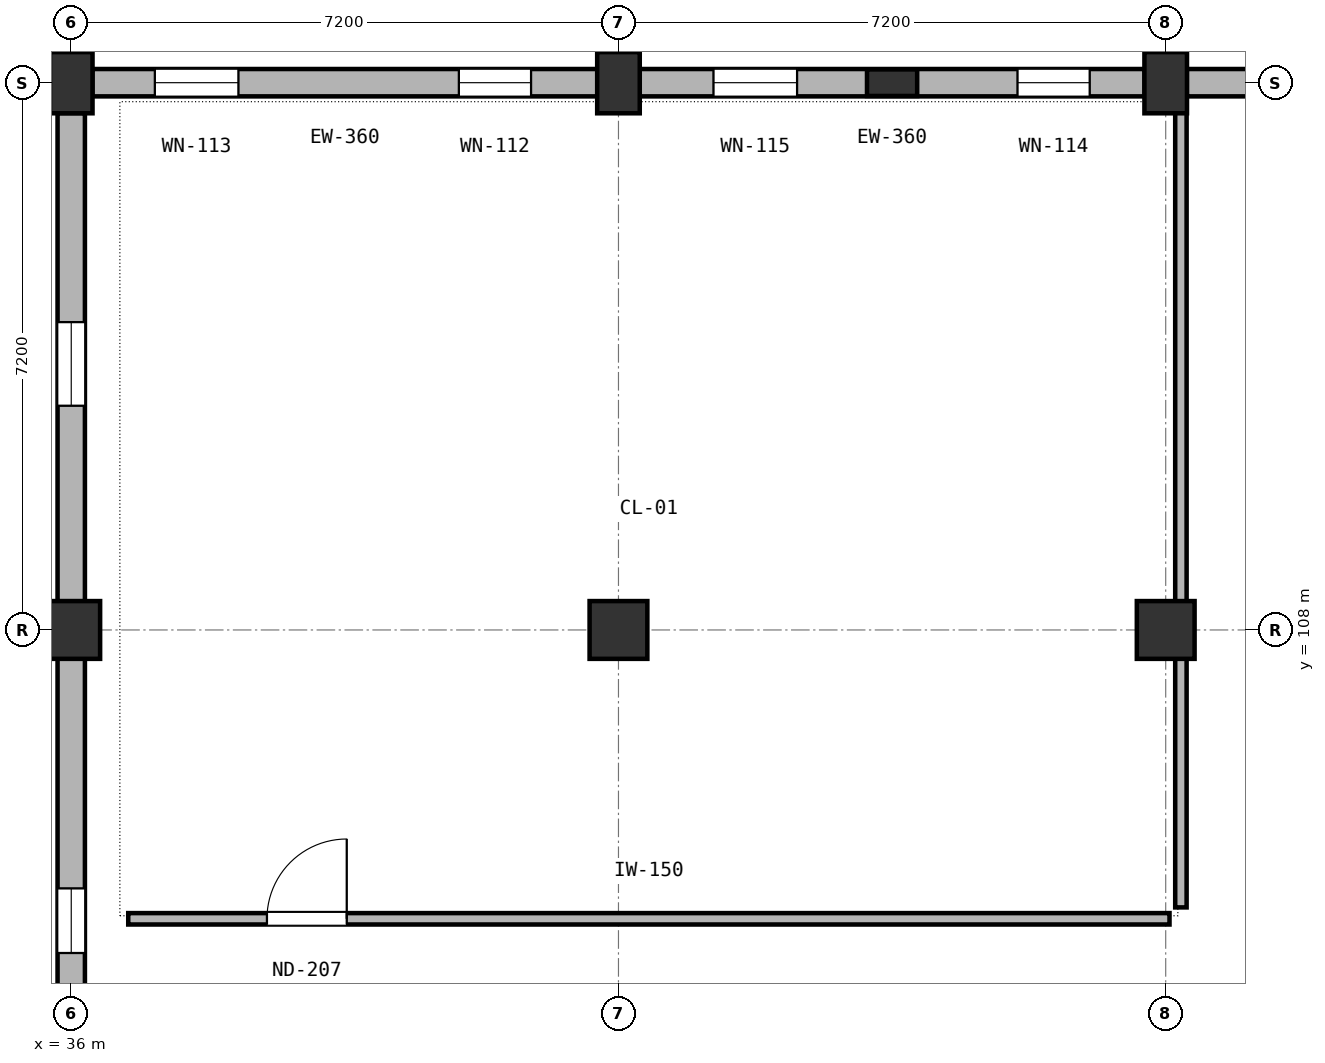
"""IFC4 building model, lengths in metres.
Left out: names, types, materials, properties, quantities, classifications, styles, units other than length and angle.
Written with IfcOpenShell. Run it as: python <this file> out.ifc"""

import sys

from ifc_helpers import new_model, si_unit, direction, frame, frame_2d, origin, origin_2d, place, context, subcontext, project, spatial, rectangle, extrude, element, fill, save


model = new_model("IFC4")
c1 = context("Model", 3, precision=1e-05, world=origin(), true_north=direction((0.0, 1.0)))
c2 = subcontext(c1, "Body", "Model", "MODEL_VIEW")
j1 = project(units=[si_unit("LENGTHUNIT", "METRE"), si_unit("PLANEANGLEUNIT", "RADIAN")], contexts=[c1])
p1 = place(None, origin())
s1 = spatial("IfcSite", under=j1, at=p1, CompositionType="ELEMENT")
p2 = place(p1, origin())
s2 = spatial("IfcBuilding", under=s1, at=p2, CompositionType="ELEMENT")
p3 = place(p2, frame((0.0, 0.0, 18.6)))
s3 = spatial("IfcBuildingStorey", under=s2, at=p3, CompositionType="ELEMENT", Elevation=18.6)
p4 = place(p3, frame((36.0, 108.0, 0.0), z_axis=(0.0, 0.0, 1.0), x_axis=(1.0, 0.0, 0.0)))
e1 = element("IfcColumn", 1, at=p4, inside=s3, PredefinedType="COLUMN", context=c2, shape_type="SweptSolid", body=[
    extrude(rectangle(XDim=0.76, YDim=0.76, at=origin_2d()), origin(), (0.0, 0.0, 1.0), 3.9),
])
p5 = place(p3, frame((36.0, 115.2, 0.0), z_axis=(0.0, 0.0, 1.0), x_axis=(1.0, 0.0, 0.0)))
e2 = element("IfcColumn", 2, at=p5, inside=s3, PredefinedType="COLUMN", context=c2, shape_type="SweptSolid", body=[
    extrude(rectangle(XDim=0.56, YDim=0.805, at=origin_2d()), origin(), (0.0, 0.0, 1.0), 3.9),
])
p6 = place(p3, frame((43.2, 108.0, 0.0), z_axis=(0.0, 0.0, 1.0), x_axis=(1.0, 0.0, 0.0)))
e3 = element("IfcColumn", 3, at=p6, inside=s3, PredefinedType="COLUMN", context=c2, shape_type="SweptSolid", body=[
    extrude(rectangle(XDim=0.76, YDim=0.76, at=origin_2d()), origin(), (0.0, 0.0, 1.0), 3.9),
])
p7 = place(p3, frame((43.2, 115.2, 0.0), z_axis=(0.0, 0.0, 1.0), x_axis=(1.0, 0.0, 0.0)))
e4 = element("IfcColumn", 4, at=p7, inside=s3, PredefinedType="COLUMN", context=c2, shape_type="SweptSolid", body=[
    extrude(rectangle(XDim=0.56, YDim=0.805, at=origin_2d()), origin(), (0.0, 0.0, 1.0), 3.9),
])
p8 = place(p3, frame((50.4, 108.0, 0.0), z_axis=(0.0, 0.0, 1.0), x_axis=(1.0, 0.0, 0.0)))
e5 = element("IfcColumn", 5, at=p8, inside=s3, PredefinedType="COLUMN", context=c2, shape_type="SweptSolid", body=[
    extrude(rectangle(XDim=0.76, YDim=0.76, at=origin_2d()), origin(), (0.0, 0.0, 1.0), 3.9),
])
p9 = place(p3, frame((50.4, 115.2, 0.0), z_axis=(0.0, 0.0, 1.0), x_axis=(1.0, 0.0, 0.0)))
e6 = element("IfcColumn", 6, at=p9, inside=s3, PredefinedType="COLUMN", context=c2, shape_type="SweptSolid", body=[
    extrude(rectangle(XDim=0.56, YDim=0.805, at=origin_2d()), origin(), (0.0, 0.0, 1.0), 3.9),
])
p10 = place(p3, frame((46.8, 115.2, 0.0), z_axis=(0.0, 0.0, 1.0), x_axis=(1.0, 0.0, 0.0)))
e7 = element("IfcColumn", 7, at=p10, inside=s3, PredefinedType="PILASTER", context=c2, shape_type="SweptSolid", body=[
    extrude(rectangle(XDim=0.66, YDim=0.35, at=origin_2d()), origin(), (0.0, 0.0, 1.0), 3.9),
])
p11 = place(p3, frame((42.922, 115.2, 0.0), z_axis=(0.0, 0.0, 1.0), x_axis=(-1.0, 0.0, 0.0)))
e8 = element("IfcWall", 8, at=p11, inside=s3, PredefinedType="SOLIDWALL", context=c2, shape_type="SweptSolid", body=[
    extrude(rectangle(XDim=6.644, YDim=0.36, at=frame_2d((3.322, 0.0))), origin(), (0.0, 0.0, 1.0), 2.74),
])
p12 = place(p11, frame((0.872, 0.0, 0.7)))
e9 = element("IfcOpeningElement", 9, at=p12, cuts=e8, PredefinedType="OPENING", context=c2, shape_type="SweptSolid", body=[
    extrude(rectangle(XDim=0.95, YDim=1.84, at=frame_2d((0.475, 0.92))), frame((0.0, 0.19, 0.0), z_axis=(0.0, -1.0, 0.0), x_axis=(1.0, 0.0, 0.0)), (0.0, 0.0, 1.0), 0.38),
])
p13 = place(p11, frame((4.722, 0.0, 0.7)))
e10 = element("IfcOpeningElement", 10, at=p13, cuts=e8, PredefinedType="OPENING", context=c2, shape_type="SweptSolid", body=[
    extrude(rectangle(XDim=1.1, YDim=1.84, at=frame_2d((0.55, 0.92))), frame((0.0, 0.19, 0.0), z_axis=(0.0, -1.0, 0.0), x_axis=(1.0, 0.0, 0.0)), (0.0, 0.0, 1.0), 0.38),
])
p14 = place(p3, frame((50.122, 115.2, 0.0), z_axis=(0.0, 0.0, 1.0), x_axis=(-1.0, 0.0, 0.0)))
e11 = element("IfcWall", 11, at=p14, inside=s3, PredefinedType="SOLIDWALL", context=c2, shape_type="SweptSolid", body=[
    extrude(rectangle(XDim=6.644, YDim=0.36, at=frame_2d((3.322, 0.0))), origin(), (0.0, 0.0, 1.0), 2.74),
])
p15 = place(p14, frame((0.722, 0.0, 0.7)))
e12 = element("IfcOpeningElement", 12, at=p15, cuts=e11, PredefinedType="OPENING", context=c2, shape_type="SweptSolid", body=[
    extrude(rectangle(XDim=0.95, YDim=1.84, at=frame_2d((0.475, 0.92))), frame((0.0, 0.19, 0.0), z_axis=(0.0, -1.0, 0.0), x_axis=(1.0, 0.0, 0.0)), (0.0, 0.0, 1.0), 0.38),
])
p16 = place(p14, frame((4.572, 0.0, 0.7)))
e13 = element("IfcOpeningElement", 13, at=p16, cuts=e11, PredefinedType="OPENING", context=c2, shape_type="SweptSolid", body=[
    extrude(rectangle(XDim=1.1, YDim=1.84, at=frame_2d((0.55, 0.92))), frame((0.0, 0.19, 0.0), z_axis=(0.0, -1.0, 0.0), x_axis=(1.0, 0.0, 0.0)), (0.0, 0.0, 1.0), 0.38),
])
p17 = place(p3, frame((57.322, 115.2, 0.0), z_axis=(0.0, 0.0, 1.0), x_axis=(-1.0, 0.0, 0.0)))
e14 = element("IfcWall", 14, at=p17, inside=s3, PredefinedType="SOLIDWALL", context=c2, shape_type="SweptSolid", body=[
    extrude(rectangle(XDim=6.644, YDim=0.36, at=frame_2d((3.322, 0.0))), origin(), (0.0, 0.0, 1.0), 2.74),
])
p18 = place(p17, frame((0.872, 0.0, 0.7)))
e15 = element("IfcOpeningElement", 15, at=p18, cuts=e14, PredefinedType="OPENING", context=c2, shape_type="SweptSolid", body=[
    extrude(rectangle(XDim=0.95, YDim=1.84, at=frame_2d((0.475, 0.92))), frame((0.0, 0.19, 0.0), z_axis=(0.0, -1.0, 0.0), x_axis=(1.0, 0.0, 0.0)), (0.0, 0.0, 1.0), 0.38),
])
p19 = place(p17, frame((4.722, 0.0, 0.7)))
e16 = element("IfcOpeningElement", 16, at=p19, cuts=e14, PredefinedType="OPENING", context=c2, shape_type="SweptSolid", body=[
    extrude(rectangle(XDim=1.1, YDim=1.84, at=frame_2d((0.55, 0.92))), frame((0.0, 0.19, 0.0), z_axis=(0.0, -1.0, 0.0), x_axis=(1.0, 0.0, 0.0)), (0.0, 0.0, 1.0), 0.38),
])
p20 = place(p3, frame((36.0, 101.178, 0.0), z_axis=(0.0, 0.0, 1.0), x_axis=(0.0, 1.0, 0.0)))
e17 = element("IfcWall", 17, at=p20, inside=s3, PredefinedType="SOLIDWALL", context=c2, shape_type="SweptSolid", body=[
    extrude(rectangle(XDim=6.444, YDim=0.36, at=frame_2d((3.222, 0.0))), origin(), (0.0, 0.0, 1.0), 2.74),
])
p21 = place(p20, frame((2.572, 0.0, 0.7)))
e18 = element("IfcOpeningElement", 18, at=p21, cuts=e17, PredefinedType="OPENING", context=c2, shape_type="SweptSolid", body=[
    extrude(rectangle(XDim=0.85, YDim=1.89, at=frame_2d((0.425, 0.945))), frame((0.0, 0.19, 0.0), z_axis=(0.0, -1.0, 0.0), x_axis=(1.0, 0.0, 0.0)), (0.0, 0.0, 1.0), 0.38),
])
p22 = place(p3, frame((36.0, 108.378, 0.0), z_axis=(0.0, 0.0, 1.0), x_axis=(0.0, 1.0, 0.0)))
e19 = element("IfcWall", 19, at=p22, inside=s3, PredefinedType="SOLIDWALL", context=c2, shape_type="SweptSolid", body=[
    extrude(rectangle(XDim=6.422, YDim=0.36, at=frame_2d((3.211, 0.0))), origin(), (0.0, 0.0, 1.0), 2.74),
])
p23 = place(p22, frame((2.572, 0.0, 0.7)))
e20 = element("IfcOpeningElement", 20, at=p23, cuts=e19, PredefinedType="OPENING", context=c2, shape_type="SweptSolid", body=[
    extrude(rectangle(XDim=1.1, YDim=1.89, at=frame_2d((0.55, 0.945))), frame((0.0, 0.19, 0.0), z_axis=(0.0, -1.0, 0.0), x_axis=(1.0, 0.0, 0.0)), (0.0, 0.0, 1.0), 0.38),
])
p24 = place(p3, frame((36.75, 104.2, 0.0), z_axis=(0.0, 0.0, 1.0), x_axis=(1.0, 0.0, 0.0)))
e21 = element("IfcWall", 21, at=p24, inside=s3, PredefinedType="PARTITIONING", context=c2, shape_type="SweptSolid", body=[
    extrude(rectangle(XDim=13.7, YDim=0.15, at=frame_2d((6.85, 0.0))), origin(), (0.0, 0.0, 1.0), 2.78),
])
p25 = place(p24, frame((1.825, 0.0, 0.0)))
e22 = element("IfcOpeningElement", 22, at=p25, cuts=e21, PredefinedType="OPENING", context=c2, shape_type="SweptSolid", body=[
    extrude(rectangle(XDim=1.05, YDim=2.15, at=frame_2d((0.525, 1.075))), frame((0.0, 0.085, 0.0), z_axis=(0.0, -1.0, 0.0), x_axis=(1.0, 0.0, 0.0)), (0.0, 0.0, 1.0), 0.17),
])
p26 = place(p3, frame((50.6, 104.35, 0.0), z_axis=(0.0, 0.0, 1.0), x_axis=(0.0, 1.0, 0.0)))
e23 = element("IfcWall", 23, at=p26, inside=s3, PredefinedType="PARTITIONING", context=c2, shape_type="SweptSolid", body=[
    extrude(rectangle(XDim=10.67, YDim=0.15, at=frame_2d((5.335, 0.0))), origin(), (0.0, 0.0, 1.0), 2.78),
])
p27 = place(p12, origin())
e24 = element("IfcWindow", 24, at=p27, inside=s3, PartitioningType="SINGLE_PANEL", PredefinedType="WINDOW", context=c2, shape_type="SweptSolid", body=[
    extrude(rectangle(XDim=0.95, YDim=1.84, at=frame_2d((0.475, 0.92))), frame((0.0, 0.03, 0.0), z_axis=(0.0, -1.0, 0.0), x_axis=(1.0, 0.0, 0.0)), (0.0, 0.0, 1.0), 0.06),
])
fill(e9, e24)
p28 = place(p13, origin())
e25 = element("IfcWindow", 25, at=p28, inside=s3, PartitioningType="SINGLE_PANEL", PredefinedType="WINDOW", context=c2, shape_type="SweptSolid", body=[
    extrude(rectangle(XDim=1.1, YDim=1.84, at=frame_2d((0.55, 0.92))), frame((0.0, 0.03, 0.0), z_axis=(0.0, -1.0, 0.0), x_axis=(1.0, 0.0, 0.0)), (0.0, 0.0, 1.0), 0.06),
])
fill(e10, e25)
p29 = place(p15, origin())
e26 = element("IfcWindow", 26, at=p29, inside=s3, PartitioningType="SINGLE_PANEL", PredefinedType="WINDOW", context=c2, shape_type="SweptSolid", body=[
    extrude(rectangle(XDim=0.95, YDim=1.84, at=frame_2d((0.475, 0.92))), frame((0.0, 0.03, 0.0), z_axis=(0.0, -1.0, 0.0), x_axis=(1.0, 0.0, 0.0)), (0.0, 0.0, 1.0), 0.06),
])
fill(e12, e26)
p30 = place(p16, origin())
e27 = element("IfcWindow", 27, at=p30, inside=s3, PartitioningType="SINGLE_PANEL", PredefinedType="WINDOW", context=c2, shape_type="SweptSolid", body=[
    extrude(rectangle(XDim=1.1, YDim=1.84, at=frame_2d((0.55, 0.92))), frame((0.0, 0.03, 0.0), z_axis=(0.0, -1.0, 0.0), x_axis=(1.0, 0.0, 0.0)), (0.0, 0.0, 1.0), 0.06),
])
fill(e13, e27)
p31 = place(p21, origin())
e28 = element("IfcWindow", 28, at=p31, inside=s3, PartitioningType="SINGLE_PANEL", PredefinedType="WINDOW", context=c2, shape_type="SweptSolid", body=[
    extrude(rectangle(XDim=0.85, YDim=1.89, at=frame_2d((0.425, 0.945))), frame((0.0, 0.03, 0.0), z_axis=(0.0, -1.0, 0.0), x_axis=(1.0, 0.0, 0.0)), (0.0, 0.0, 1.0), 0.06),
])
fill(e18, e28)
p32 = place(p23, origin())
e29 = element("IfcWindow", 29, at=p32, inside=s3, PartitioningType="SINGLE_PANEL", PredefinedType="WINDOW", context=c2, shape_type="SweptSolid", body=[
    extrude(rectangle(XDim=1.1, YDim=1.89, at=frame_2d((0.55, 0.945))), frame((0.0, 0.03, 0.0), z_axis=(0.0, -1.0, 0.0), x_axis=(1.0, 0.0, 0.0)), (0.0, 0.0, 1.0), 0.06),
])
fill(e20, e29)
p33 = place(p25, origin())
e30 = element("IfcDoor", 30, at=p33, inside=s3, OperationType="SINGLE_SWING_RIGHT", PredefinedType="DOOR", context=c2, shape_type="SweptSolid", body=[
    extrude(rectangle(XDim=1.05, YDim=2.15, at=frame_2d((0.525, 1.075))), frame((0.0, 0.025, 0.0), z_axis=(0.0, -1.0, 0.0), x_axis=(1.0, 0.0, 0.0)), (0.0, 0.0, 1.0), 0.05),
])
fill(e22, e30)
save(model, sys.argv[1])
